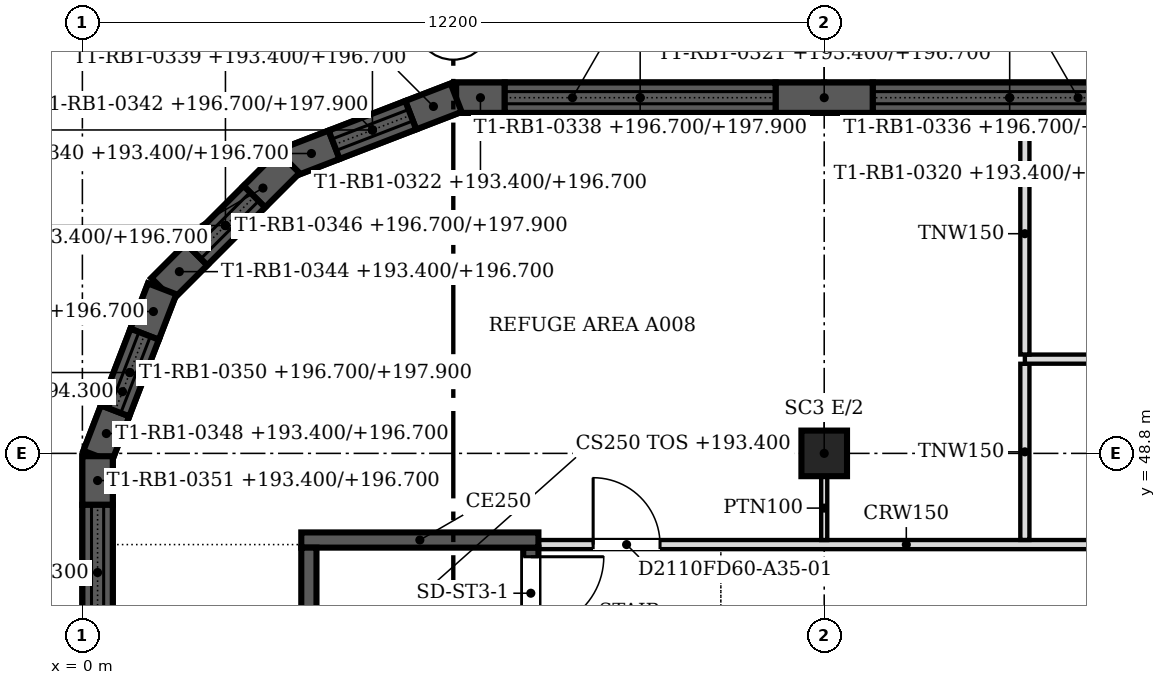
"""IFC4 building model, lengths in metres.
Left out: names, types, materials, properties, quantities, classifications, styles, units other than length and angle.
Written with IfcOpenShell. Run it as: python <this file> out.ifc"""

import sys

from ifc_helpers import new_model, si_unit, direction, frame, frame_2d, origin, origin_2d, place, context, subcontext, project, spatial, polyline, rectangle, outline, extrude, faceted_brep, source, transform, mapped, element, fill, save


model = new_model("IFC4")
c1 = context("Model", 3, precision=1e-05, world=origin(), true_north=direction((0.0, 1.0)))
c2 = subcontext(c1, "Body", "Model", "MODEL_VIEW")
j1 = project(units=[si_unit("LENGTHUNIT", "METRE"), si_unit("PLANEANGLEUNIT", "RADIAN")], contexts=[c1])
p1 = place(None, origin())
s1 = spatial("IfcSite", under=j1, at=p1, CompositionType="ELEMENT")
p2 = place(p1, origin())
s2 = spatial("IfcBuilding", under=s1, at=p2, CompositionType="ELEMENT")
p3 = place(p2, frame((0.0, 0.0, 193.4)))
s3 = spatial("IfcBuildingStorey", under=s2, at=p3, CompositionType="ELEMENT", Elevation=193.4)
p4 = place(p3, frame((12.2, 48.8, 0.0), z_axis=(0.0, 0.0, 1.0), x_axis=(1.0, 0.0, 0.0)))
e1 = element("IfcColumn", 1, at=p4, inside=s3, PredefinedType="COLUMN", context=c2, shape_type="SweptSolid", body=[
    extrude(rectangle(XDim=0.75, YDim=0.75, at=origin_2d()), origin(), (0.0, 0.0, 1.0), 4.3),
])
m1 = source(origin(), c2, "Body", "SweptSolid", [
    extrude(outline(polyline([(0.0, 0.0), (1.6, 0.0), (1.6, 3.3), (0.0, 3.3), (0.0, 0.0)])), frame((0.0, 0.25, 0.0), z_axis=(0.0, -1.0, 0.0), x_axis=(1.0, 0.0, 0.0)), (0.0, 0.0, 1.0), 0.5),
])
p5 = place(p3, frame((13.0, 54.65, 0.0), z_axis=(0.0, 0.0, 1.0), x_axis=(-1.0, 0.0, 0.0)))
e2 = element("IfcWall", 2, at=p5, inside=s3, PredefinedType="SOLIDWALL", context=c2, shape_type="MappedRepresentation", body=[
    mapped(m1, transform((0.0, 0.0, 0.0), scale=1.0)),
])
m2 = source(origin(), c2, "Body", "Brep", [
    faceted_brep([(0.0, -0.25, 0.0), (0.8, -0.25, 0.0), (0.8, -0.25, 3.3), (0.0, -0.25, 3.3), (0.0, 0.25, 3.3), (0.753, 0.25, 3.3), (0.753, 0.25, 0.0), (0.0, 0.25, 0.0), (0.8, -0.0, 0.0), (0.8, -0.0, 3.3)], [[[0, 1, 2, 3]], [[4, 5, 6, 7]], [[7, 6, 8, 1, 0]], [[9, 2, 1, 8]], [[5, 4, 3, 2, 9]], [[4, 7, 0, 3]], [[8, 6, 5, 9]]]),
])
p6 = place(p3, frame((6.947, 54.65, 0.0), z_axis=(0.0, 0.0, 1.0), x_axis=(-1.0, 0.0, 0.0)))
e3 = element("IfcWall", 3, at=p6, inside=s3, PredefinedType="SOLIDWALL", context=c2, shape_type="MappedRepresentation", body=[
    mapped(m2, transform((0.0, 0.0, 0.0), scale=1.0)),
])
m3 = source(origin(), c2, "Body", "SweptSolid", [
    extrude(outline(polyline([(0.0, 0.0), (4.5, 0.0), (4.5, 0.9), (0.0, 0.9), (0.0, 0.0)])), frame((0.0, 0.25, 0.0), z_axis=(0.0, -1.0, 0.0), x_axis=(1.0, 0.0, 0.0)), (0.0, 0.0, 1.0), 0.5),
])
p7 = place(p3, frame((17.5, 54.65, 0.0), z_axis=(0.0, 0.0, 1.0), x_axis=(-1.0, 0.0, 0.0)))
e4 = element("IfcWall", 4, at=p7, inside=s3, PredefinedType="SOLIDWALL", context=c2, shape_type="MappedRepresentation", body=[
    mapped(m3, transform((0.0, 0.0, 0.0), scale=1.0)),
])
m4 = source(origin(), c2, "Body", "SweptSolid", [
    extrude(outline(polyline([(0.0, 0.0), (6.1, 0.0), (6.1, 1.2), (0.0, 1.2), (0.0, 0.0)])), frame((0.0, 0.25, 0.0), z_axis=(0.0, -1.0, 0.0), x_axis=(1.0, 0.0, 0.0)), (0.0, 0.0, 1.0), 0.5),
])
p8 = place(p3, frame((18.3, 54.65, 3.3), z_axis=(0.0, 0.0, 1.0), x_axis=(-1.0, 0.0, 0.0)))
e5 = element("IfcWall", 5, at=p8, inside=s3, PredefinedType="SOLIDWALL", context=c2, shape_type="MappedRepresentation", body=[
    mapped(m4, transform((0.0, 0.0, 0.0), scale=1.0)),
])
m5 = source(origin(), c2, "Body", "SweptSolid", [
    extrude(outline(polyline([(0.0, 0.0), (4.453, 0.0), (4.453, 0.9), (0.0, 0.9), (0.0, 0.0)])), frame((0.0, 0.25, 0.0), z_axis=(0.0, -1.0, 0.0), x_axis=(1.0, 0.0, 0.0)), (0.0, 0.0, 1.0), 0.5),
])
p9 = place(p3, frame((11.4, 54.65, 0.0), z_axis=(0.0, 0.0, 1.0), x_axis=(-1.0, 0.0, 0.0)))
e6 = element("IfcWall", 6, at=p9, inside=s3, PredefinedType="SOLIDWALL", context=c2, shape_type="MappedRepresentation", body=[
    mapped(m5, transform((0.0, 0.0, 0.0), scale=1.0)),
])
m6 = source(origin(), c2, "Body", "Brep", [
    faceted_brep([(0.0, -0.25, 0.0), (6.053, -0.25, 0.0), (6.053, -0.25, 1.2), (0.0, -0.25, 1.2), (0.0, 0.25, 1.2), (6.007, 0.25, 1.2), (6.007, 0.25, 0.0), (0.0, 0.25, 0.0), (6.053, 0.0, 0.0), (6.053, 0.0, 1.2)], [[[0, 1, 2, 3]], [[4, 5, 6, 7]], [[7, 6, 8, 1, 0]], [[9, 2, 1, 8]], [[5, 4, 3, 2, 9]], [[4, 7, 0, 3]], [[8, 6, 5, 9]]]),
])
p10 = place(p3, frame((12.2, 54.65, 3.3), z_axis=(0.0, 0.0, 1.0), x_axis=(-1.0, 0.0, 0.0)))
e7 = element("IfcWall", 7, at=p10, inside=s3, PredefinedType="SOLIDWALL", context=c2, shape_type="MappedRepresentation", body=[
    mapped(m6, transform((0.0, 0.0, 0.0), scale=1.0)),
])
m7 = source(origin(), c2, "Body", "Brep", [
    faceted_brep([(0.0, -0.25, 0.0), (0.8, -0.25, 0.0), (0.8, -0.25, 3.3), (0.0, -0.25, 3.3), (0.047, 0.25, 3.3), (0.8, 0.25, 3.3), (0.8, 0.25, 0.0), (0.047, 0.25, 0.0), (0.0, 0.0, 0.0), (0.0, 0.0, 3.3)], [[[0, 1, 2, 3]], [[4, 5, 6, 7]], [[7, 6, 1, 0, 8]], [[5, 4, 9, 3, 2]], [[8, 0, 3, 9]], [[7, 8, 9, 4]], [[1, 6, 5, 2]]]),
])
p11 = place(p3, frame((6.146, 54.65, 0.0), z_axis=(0.0, 0.0, 1.0), x_axis=(-0.93301483327, -0.3598379092, 0.0)))
e8 = element("IfcWall", 8, at=p11, inside=s3, PredefinedType="SOLIDWALL", context=c2, shape_type="MappedRepresentation", body=[
    mapped(m7, transform((0.0, 0.0, 0.0), scale=1.0)),
])
m8 = source(origin(), c2, "Body", "Brep", [
    faceted_brep([(0.0, -0.25, 0.0), (0.8, -0.25, 0.0), (0.8, -0.25, 3.3), (0.0, -0.25, 3.3), (0.0, 0.25, 3.3), (0.747, 0.25, 3.3), (0.747, 0.25, 0.0), (0.0, 0.25, 0.0), (0.8, -0.0, 0.0), (0.8, -0.0, 3.3)], [[[0, 1, 2, 3]], [[4, 5, 6, 7]], [[7, 6, 8, 1, 0]], [[9, 2, 1, 8]], [[5, 4, 3, 2, 9]], [[4, 7, 0, 3]], [[8, 6, 5, 9]]]),
])
p12 = place(p3, frame((4.14, 53.876, 0.0), z_axis=(0.0, 0.0, 1.0), x_axis=(-0.93301483327, -0.3598379092, 0.0)))
e9 = element("IfcWall", 9, at=p12, inside=s3, PredefinedType="SOLIDWALL", context=c2, shape_type="MappedRepresentation", body=[
    mapped(m8, transform((0.0, 0.0, 0.0), scale=1.0)),
])
m9 = source(origin(), c2, "Body", "SweptSolid", [
    extrude(outline(polyline([(0.0, 0.0), (1.351, 0.0), (1.351, 0.9), (0.0, 0.9), (0.0, 0.0)])), frame((0.0, 0.25, 0.0), z_axis=(0.0, -1.0, 0.0), x_axis=(1.0, 0.0, 0.0)), (0.0, 0.0, 1.0), 0.5),
])
p13 = place(p3, frame((5.4, 54.362, 0.0), z_axis=(0.0, 0.0, 1.0), x_axis=(-0.932981713512, -0.359923772835, 0.0)))
e10 = element("IfcWall", 10, at=p13, inside=s3, PredefinedType="SOLIDWALL", context=c2, shape_type="MappedRepresentation", body=[
    mapped(m9, transform((0.0, 0.0, 0.0), scale=1.0)),
])
m10 = source(origin(), c2, "Body", "Brep", [
    faceted_brep([(0.0, -0.25, 0.0), (2.95, -0.25, 0.0), (2.95, -0.25, 1.2), (0.0, -0.25, 1.2), (0.047, 0.25, 1.2), (2.898, 0.25, 1.2), (2.898, 0.25, 0.0), (0.047, 0.25, 0.0), (2.95, 0.0, 0.0), (0.0, 0.0, 0.0), (2.95, 0.0, 1.2), (0.0, 0.0, 1.2)], [[[0, 1, 2, 3]], [[4, 5, 6, 7]], [[7, 6, 8, 1, 0, 9]], [[10, 2, 1, 8]], [[5, 4, 11, 3, 2, 10]], [[9, 0, 3, 11]], [[7, 9, 11, 4]], [[8, 6, 5, 10]]]),
])
p14 = place(p3, frame((6.146, 54.65, 3.3), z_axis=(0.0, 0.0, 1.0), x_axis=(-0.932999673775, -0.359877213415, 0.0)))
e11 = element("IfcWall", 11, at=p14, inside=s3, PredefinedType="SOLIDWALL", context=c2, shape_type="MappedRepresentation", body=[
    mapped(m10, transform((0.0, 0.0, 0.0), scale=1.0)),
])
m11 = source(origin(), c2, "Body", "Brep", [
    faceted_brep([(0.0, -0.25, 0.0), (0.8, -0.25, 0.0), (0.8, -0.25, 3.3), (0.0, -0.25, 3.3), (0.053, 0.25, 3.3), (0.8, 0.25, 3.3), (0.8, 0.25, 0.0), (0.053, 0.25, 0.0), (0.0, 0.0, 0.0), (0.0, 0.0, 3.3)], [[[0, 1, 2, 3]], [[4, 5, 6, 7]], [[7, 6, 1, 0, 8]], [[5, 4, 9, 3, 2]], [[8, 0, 3, 9]], [[7, 8, 9, 4]], [[1, 6, 5, 2]]]),
])
p15 = place(p3, frame((3.394, 53.588, 0.0), z_axis=(0.0, 0.0, 1.0), x_axis=(-0.707106781187, -0.707106781187, 0.0)))
e12 = element("IfcWall", 12, at=p15, inside=s3, PredefinedType="SOLIDWALL", context=c2, shape_type="MappedRepresentation", body=[
    mapped(m11, transform((0.0, 0.0, 0.0), scale=1.0)),
])
m12 = source(origin(), c2, "Body", "Brep", [
    faceted_brep([(0.0, -0.25, 0.0), (0.8, -0.25, 0.0), (0.8, -0.25, 3.3), (0.0, -0.25, 3.3), (0.0, 0.25, 3.3), (0.747, 0.25, 3.3), (0.747, 0.25, 0.0), (0.0, 0.25, 0.0), (0.8, -0.0, 0.0), (0.8, -0.0, 3.3)], [[[0, 1, 2, 3]], [[4, 5, 6, 7]], [[7, 6, 8, 1, 0]], [[9, 2, 1, 8]], [[5, 4, 3, 2, 9]], [[4, 7, 0, 3]], [[8, 6, 5, 9]]]),
])
p16 = place(p3, frame((1.878, 52.072, 0.0), z_axis=(0.0, 0.0, 1.0), x_axis=(-0.707259322823, -0.706954206636, 0.0)))
e13 = element("IfcWall", 13, at=p16, inside=s3, PredefinedType="SOLIDWALL", context=c2, shape_type="MappedRepresentation", body=[
    mapped(m12, transform((0.0, 0.0, 0.0), scale=1.0)),
])
m13 = source(origin(), c2, "Body", "SweptSolid", [
    extrude(outline(polyline([(0.0, 0.0), (1.344, 0.0), (1.344, 0.9), (0.0, 0.9), (0.0, 0.0)])), frame((0.0, 0.25, 0.0), z_axis=(0.0, -1.0, 0.0), x_axis=(1.0, 0.0, 0.0)), (0.0, 0.0, 1.0), 0.5),
])
p17 = place(p3, frame((2.828, 53.022, 0.0), z_axis=(0.0, 0.0, 1.0), x_axis=(-0.707106781187, -0.707106781187, 0.0)))
e14 = element("IfcWall", 14, at=p17, inside=s3, PredefinedType="SOLIDWALL", context=c2, shape_type="MappedRepresentation", body=[
    mapped(m13, transform((0.0, 0.0, 0.0), scale=1.0)),
])
m14 = source(origin(), c2, "Body", "Brep", [
    faceted_brep([(0.0, -0.25, 0.0), (2.944, -0.25, 0.0), (2.944, -0.25, 1.2), (0.0, -0.25, 1.2), (0.053, 0.25, 1.2), (2.891, 0.25, 1.2), (2.891, 0.25, 0.0), (0.053, 0.25, 0.0), (2.944, 0.0, 0.0), (0.0, 0.0, 0.0), (2.944, 0.0, 1.2), (0.0, 0.0, 1.2)], [[[0, 1, 2, 3]], [[4, 5, 6, 7]], [[7, 6, 8, 1, 0, 9]], [[10, 2, 1, 8]], [[5, 4, 11, 3, 2, 10]], [[9, 0, 3, 11]], [[7, 9, 11, 4]], [[8, 6, 5, 10]]]),
])
p18 = place(p3, frame((3.394, 53.588, 3.3), z_axis=(0.0, 0.0, 1.0), x_axis=(-0.707106781187, -0.707106781187, 0.0)))
e15 = element("IfcWall", 15, at=p18, inside=s3, PredefinedType="SOLIDWALL", context=c2, shape_type="MappedRepresentation", body=[
    mapped(m14, transform((0.0, 0.0, 0.0), scale=1.0)),
])
m15 = source(origin(), c2, "Body", "Brep", [
    faceted_brep([(0.0, -0.25, 0.0), (0.8, -0.25, 0.0), (0.8, -0.25, 3.3), (0.0, -0.25, 3.3), (0.053, 0.25, 3.3), (0.8, 0.25, 3.3), (0.8, 0.25, 0.0), (0.053, 0.25, 0.0), (0.0, 0.0, 0.0), (0.0, 0.0, 3.3)], [[[0, 1, 2, 3]], [[4, 5, 6, 7]], [[7, 6, 1, 0, 8]], [[5, 4, 9, 3, 2]], [[8, 0, 3, 9]], [[7, 8, 9, 4]], [[1, 6, 5, 2]]]),
])
p19 = place(p3, frame((1.312, 51.506, 0.0), z_axis=(0.0, 0.0, 1.0), x_axis=(-0.360001058183, -0.932951894851, 0.0)))
e16 = element("IfcWall", 16, at=p19, inside=s3, PredefinedType="SOLIDWALL", context=c2, shape_type="MappedRepresentation", body=[
    mapped(m15, transform((0.0, 0.0, 0.0), scale=1.0)),
])
m16 = source(origin(), c2, "Body", "Brep", [
    faceted_brep([(0.0, -0.25, 0.0), (0.8, -0.25, 0.0), (0.8, -0.25, 3.3), (0.0, -0.25, 3.3), (0.0, 0.25, 3.3), (0.753, 0.25, 3.3), (0.753, 0.25, 0.0), (0.0, 0.25, 0.0), (0.8, -0.0, 0.0), (0.8, -0.0, 3.3)], [[[0, 1, 2, 3]], [[4, 5, 6, 7]], [[7, 6, 8, 1, 0]], [[9, 2, 1, 8]], [[5, 4, 3, 2, 9]], [[4, 7, 0, 3]], [[8, 6, 5, 9]]]),
])
p20 = place(p3, frame((0.538, 49.5, 0.0), z_axis=(0.0, 0.0, 1.0), x_axis=(-0.3598379092, -0.93301483327, 0.0)))
e17 = element("IfcWall", 17, at=p20, inside=s3, PredefinedType="SOLIDWALL", context=c2, shape_type="MappedRepresentation", body=[
    mapped(m16, transform((0.0, 0.0, 0.0), scale=1.0)),
])
p21 = place(p3, frame((1.024, 50.76, 0.0), z_axis=(0.0, 0.0, 1.0), x_axis=(-0.359923772835, -0.932981713512, 0.0)))
e18 = element("IfcWall", 18, at=p21, inside=s3, PredefinedType="SOLIDWALL", context=c2, shape_type="MappedRepresentation", body=[
    mapped(m9, transform((0.0, 0.0, 0.0), scale=1.0)),
])
m17 = source(origin(), c2, "Body", "Brep", [
    faceted_brep([(0.0, -0.25, 0.0), (2.95, -0.25, 0.0), (2.95, -0.25, 1.2), (0.0, -0.25, 1.2), (0.053, 0.25, 1.2), (2.904, 0.25, 1.2), (2.904, 0.25, 0.0), (0.053, 0.25, 0.0), (2.95, 0.0, 0.0), (0.0, 0.0, 0.0), (2.95, 0.0, 1.2), (0.0, 0.0, 1.2)], [[[0, 1, 2, 3]], [[4, 5, 6, 7]], [[7, 6, 8, 1, 0, 9]], [[10, 2, 1, 8]], [[5, 4, 11, 3, 2, 10]], [[9, 0, 3, 11]], [[7, 9, 11, 4]], [[8, 6, 5, 10]]]),
])
p22 = place(p3, frame((1.312, 51.506, 3.3), z_axis=(0.0, 0.0, 1.0), x_axis=(-0.359921456299, -0.932982607178, 0.0)))
e19 = element("IfcWall", 19, at=p22, inside=s3, PredefinedType="SOLIDWALL", context=c2, shape_type="MappedRepresentation", body=[
    mapped(m17, transform((0.0, 0.0, 0.0), scale=1.0)),
])
m18 = source(origin(), c2, "Body", "Brep", [
    faceted_brep([(0.0, -0.25, 0.0), (0.8, -0.25, 0.0), (0.8, -0.25, 3.3), (0.0, -0.25, 3.3), (0.047, 0.25, 3.3), (0.8, 0.25, 3.3), (0.8, 0.25, 0.0), (0.047, 0.25, 0.0), (0.0, 0.0, 0.0), (0.0, 0.0, 3.3)], [[[0, 1, 2, 3]], [[4, 5, 6, 7]], [[7, 6, 1, 0, 8]], [[5, 4, 9, 3, 2]], [[8, 0, 3, 9]], [[7, 8, 9, 4]], [[1, 6, 5, 2]]]),
])
p23 = place(p3, frame((0.25, 48.753, 0.0), z_axis=(0.0, 0.0, 1.0), x_axis=(0.0, -1.0, 0.0)))
e20 = element("IfcWall", 20, at=p23, inside=s3, PredefinedType="SOLIDWALL", context=c2, shape_type="MappedRepresentation", body=[
    mapped(m18, transform((0.0, 0.0, 0.0), scale=1.0)),
])
p24 = place(p3, frame((0.25, 47.953, 0.0), z_axis=(0.0, 0.0, 1.0), x_axis=(0.0, -1.0, 0.0)))
e21 = element("IfcWall", 21, at=p24, inside=s3, PredefinedType="SOLIDWALL", context=c2, shape_type="MappedRepresentation", body=[
    mapped(m5, transform((0.0, 0.0, 0.0), scale=1.0)),
])
m19 = source(origin(), c2, "Body", "Brep", [
    faceted_brep([(0.0, -0.25, 0.0), (6.053, -0.25, 0.0), (6.053, -0.25, 1.2), (0.0, -0.25, 1.2), (0.047, 0.25, 1.2), (6.053, 0.25, 1.2), (6.053, 0.25, 0.0), (0.047, 0.25, 0.0), (0.0, 0.0, 0.0), (0.0, 0.0, 1.2)], [[[0, 1, 2, 3]], [[4, 5, 6, 7]], [[7, 6, 1, 0, 8]], [[5, 4, 9, 3, 2]], [[8, 0, 3, 9]], [[7, 8, 9, 4]], [[1, 6, 5, 2]]]),
])
p25 = place(p3, frame((0.25, 48.753, 3.3), z_axis=(0.0, 0.0, 1.0), x_axis=(0.0, -1.0, 0.0)))
e22 = element("IfcWall", 22, at=p25, inside=s3, PredefinedType="SOLIDWALL", context=c2, shape_type="MappedRepresentation", body=[
    mapped(m19, transform((0.0, 0.0, 0.0), scale=1.0)),
])
p26 = place(p3, frame((3.725, 39.25, 0.0), z_axis=(0.0, 0.0, 1.0), x_axis=(0.0, 1.0, 0.0)))
e23 = element("IfcWall", 23, at=p26, inside=s3, PredefinedType="SOLIDWALL", context=c2, shape_type="SweptSolid", body=[
    extrude(rectangle(XDim=8.0, YDim=0.25, at=frame_2d((4.0, 0.0))), origin(), (0.0, 0.0, 1.0), 4.5),
])
p27 = place(p3, frame((3.6, 47.375, 0.0), z_axis=(0.0, 0.0, 1.0), x_axis=(1.0, 0.0, 0.0)))
e24 = element("IfcWall", 24, at=p27, inside=s3, PredefinedType="SOLIDWALL", context=c2, shape_type="SweptSolid", body=[
    extrude(rectangle(XDim=3.9, YDim=0.25, at=frame_2d((1.95, 0.0))), origin(), (0.0, 0.0, 1.0), 4.5),
])
p28 = place(p3, frame((7.375, 47.25, 0.0), z_axis=(0.0, 0.0, 1.0), x_axis=(0.0, -1.0, 0.0)))
e25 = element("IfcWall", 25, at=p28, inside=s3, PredefinedType="SOLIDWALL", context=c2, shape_type="SweptSolid", body=[
    extrude(rectangle(XDim=8.0, YDim=0.25, at=frame_2d((4.0, 0.0))), origin(), (0.0, 0.0, 1.0), 4.5),
])
m20 = source(origin(), c2, "Body", "SweptSolid", [
    extrude(rectangle(XDim=1.2, YDim=2.1, at=frame_2d((0.6, 1.05))), frame((0.0, 0.135, 0.0), z_axis=(0.0, -1.0, 0.0), x_axis=(1.0, 0.0, 0.0)), (0.0, 0.0, 1.0), 0.27),
])
p29 = place(p28, frame((0.15, 0.0, 0.0)))
e26 = element("IfcOpeningElement", 26, at=p29, cuts=e25, PredefinedType="OPENING", context=c2, shape_type="MappedRepresentation", body=[
    mapped(m20, transform((0.0, 0.0, 0.0), scale=1.0)),
])
p30 = place(p3, frame((7.5, 47.3, 0.0), z_axis=(0.0, 0.0, 1.0), x_axis=(1.0, 0.0, 0.0)))
e27 = element("IfcWall", 27, at=p30, inside=s3, PredefinedType="PARTITIONING", context=c2, shape_type="SweptSolid", body=[
    extrude(rectangle(XDim=20.6, YDim=0.15, at=frame_2d((10.3, 0.0))), origin(), (0.0, 0.0, 1.0), 3.767),
])
m21 = source(origin(), c2, "Body", "SweptSolid", [
    extrude(rectangle(XDim=1.1, YDim=2.1, at=frame_2d((0.55, 1.05))), frame((0.0, 0.085, 0.0), z_axis=(0.0, -1.0, 0.0), x_axis=(1.0, 0.0, 0.0)), (0.0, 0.0, 1.0), 0.17),
])
p31 = place(p30, frame((0.9, 0.0, 0.0)))
e28 = element("IfcOpeningElement", 28, at=p31, cuts=e27, PredefinedType="OPENING", context=c2, shape_type="MappedRepresentation", body=[
    mapped(m21, transform((0.0, 0.0, 0.0), scale=1.0)),
])
m22 = source(origin(), c2, "Body", "SweptSolid", [
    extrude(rectangle(XDim=1.8, YDim=2.1, at=frame_2d((0.9, 1.05))), frame((0.0, 0.085, 0.0), z_axis=(0.0, -1.0, 0.0), x_axis=(1.0, 0.0, 0.0)), (0.0, 0.0, 1.0), 0.17),
])
p32 = place(p30, frame((10.1, 0.0, 0.0)))
e29 = element("IfcOpeningElement", 29, at=p32, cuts=e27, PredefinedType="OPENING", context=c2, shape_type="MappedRepresentation", body=[
    mapped(m22, transform((0.0, 0.0, 0.0), scale=1.0)),
])
m23 = source(origin(), c2, "Body", "SweptSolid", [
    extrude(rectangle(XDim=1.0, YDim=2.1, at=frame_2d((0.5, 1.05))), frame((0.0, 0.085, 0.0), z_axis=(0.0, -1.0, 0.0), x_axis=(1.0, 0.0, 0.0)), (0.0, 0.0, 1.0), 0.17),
])
p33 = place(p30, frame((17.3, 0.0, 0.0)))
e30 = element("IfcOpeningElement", 30, at=p33, cuts=e27, PredefinedType="OPENING", context=c2, shape_type="MappedRepresentation", body=[
    mapped(m23, transform((0.0, 0.0, 0.0), scale=1.0)),
])
p34 = place(p3, frame((15.5, 47.376, 0.0), z_axis=(0.0, 0.0, 1.0), x_axis=(0.0, 1.0, 0.0)))
e31 = element("IfcWall", 31, at=p34, inside=s3, PredefinedType="PARTITIONING", context=c2, shape_type="SweptSolid", body=[
    extrude(rectangle(XDim=2.898, YDim=0.15, at=frame_2d((1.449, 0.0))), origin(), (0.0, 0.0, 1.0), 3.767),
])
p35 = place(p3, frame((12.2, 48.425, 0.0), z_axis=(0.0, 0.0, 1.0), x_axis=(0.0, -1.0, 0.0)))
e32 = element("IfcWall", 32, at=p35, inside=s3, PredefinedType="PARTITIONING", context=c2, shape_type="SweptSolid", body=[
    extrude(rectangle(XDim=1.05, YDim=0.1, at=frame_2d((0.525, 0.0))), origin(), (0.0, 0.0, 1.0), 3.767),
])
p36 = place(p3, frame((15.5, 50.35, 0.0), z_axis=(0.0, 0.0, 1.0), x_axis=(1.0, 0.0, 0.0)))
e33 = element("IfcWall", 33, at=p36, inside=s3, PredefinedType="PARTITIONING", context=c2, shape_type="SweptSolid", body=[
    extrude(rectangle(XDim=6.1, YDim=0.15, at=frame_2d((3.05, 0.0))), origin(), (0.0, 0.0, 1.0), 3.767),
])
m24 = source(origin(), c2, "Body", "SweptSolid", [
    extrude(rectangle(XDim=0.9, YDim=2.1, at=frame_2d((0.45, 1.05))), frame((0.0, 0.085, 0.0), z_axis=(0.0, -1.0, 0.0), x_axis=(1.0, 0.0, 0.0)), (0.0, 0.0, 1.0), 0.17),
])
p37 = place(p36, frame((2.6, 0.0, 0.0)))
e34 = element("IfcOpeningElement", 34, at=p37, cuts=e33, PredefinedType="OPENING", context=c2, shape_type="MappedRepresentation", body=[
    mapped(m24, transform((0.0, 0.0, 0.0), scale=1.0)),
])
p38 = place(p3, frame((15.5, 50.426, 0.0), z_axis=(0.0, 0.0, 1.0), x_axis=(0.0, 1.0, 0.0)))
e35 = element("IfcWall", 35, at=p38, inside=s3, PredefinedType="PARTITIONING", context=c2, shape_type="SweptSolid", body=[
    extrude(rectangle(XDim=3.974, YDim=0.15, at=frame_2d((1.987, 0.0))), origin(), (0.0, 0.0, 1.0), 3.767),
])
m25 = source(origin(), c2, "Body", "SweptSolid", [
    extrude(rectangle(XDim=1.2, YDim=2.1, at=frame_2d((0.6, 1.05))), frame((0.0, 0.025, 0.0), z_axis=(0.0, -1.0, 0.0), x_axis=(1.0, 0.0, 0.0)), (0.0, 0.0, 1.0), 0.05),
])
p39 = place(p29, origin())
e36 = element("IfcDoor", 36, at=p39, inside=s3, OperationType="SINGLE_SWING_LEFT", PredefinedType="DOOR", context=c2, shape_type="MappedRepresentation", body=[
    mapped(m25, transform((0.0, 0.0, 0.0), scale=1.0)),
])
fill(e26, e36)
m26 = source(origin(), c2, "Body", "SweptSolid", [
    extrude(rectangle(XDim=1.1, YDim=2.1, at=frame_2d((0.55, 1.05))), frame((0.0, 0.025, 0.0), z_axis=(0.0, -1.0, 0.0), x_axis=(1.0, 0.0, 0.0)), (0.0, 0.0, 1.0), 0.05),
])
p40 = place(p31, origin())
e37 = element("IfcDoor", 37, at=p40, inside=s3, OperationType="SINGLE_SWING_LEFT", PredefinedType="DOOR", context=c2, shape_type="MappedRepresentation", body=[
    mapped(m26, transform((0.0, 0.0, 0.0), scale=1.0)),
])
fill(e28, e37)
save(model, sys.argv[1])
